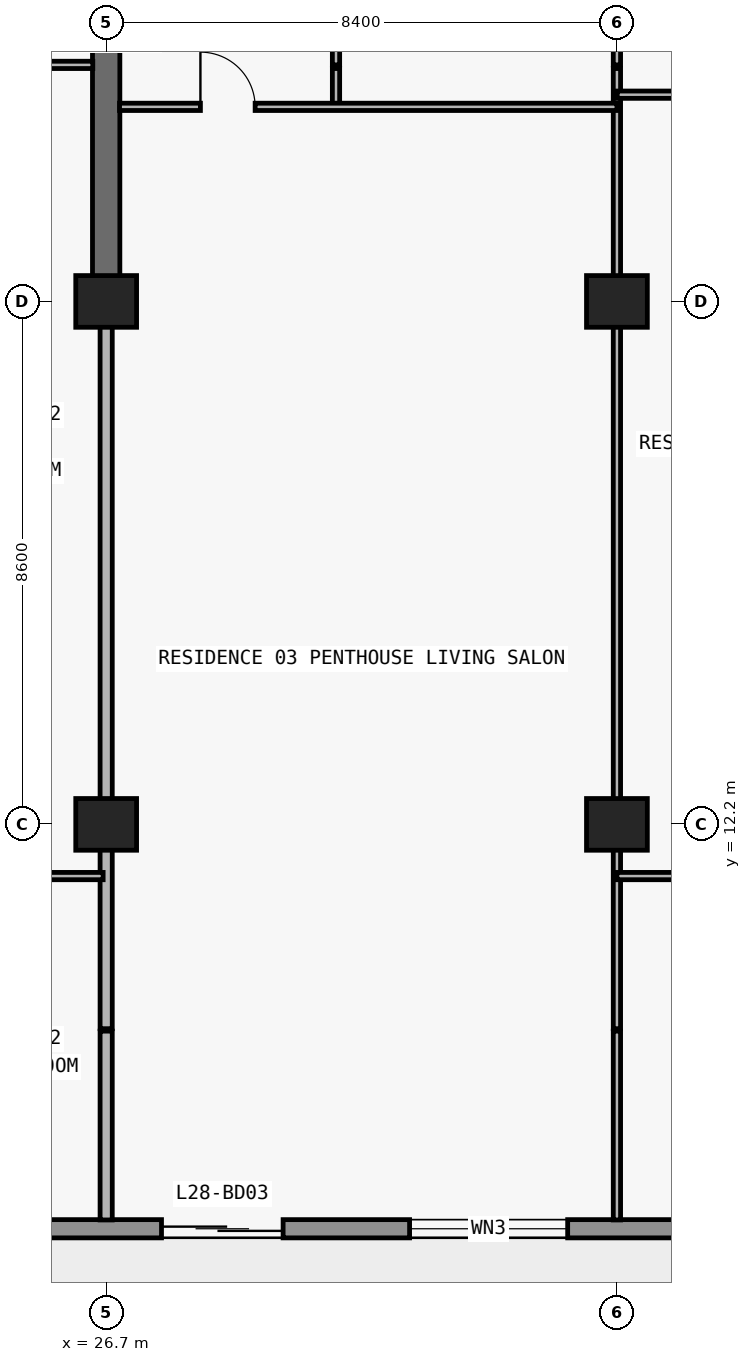
"""IFC4 building model, lengths in metres.
Left out: names, types, materials, properties, quantities, classifications, styles, units other than length and angle.
Written with IfcOpenShell. Run it as: python <this file> out.ifc"""

import sys

from ifc_helpers import new_model, si_unit, direction, frame, frame_2d, origin, origin_2d, place, context, subcontext, project, spatial, rectangle, extrude, element, fill, save


model = new_model("IFC4")
c1 = context("Model", 3, precision=1e-05, world=origin(), true_north=direction((0.0, 1.0)))
c2 = subcontext(c1, "Body", "Model", "MODEL_VIEW")
j1 = project(units=[si_unit("LENGTHUNIT", "METRE"), si_unit("PLANEANGLEUNIT", "RADIAN")], contexts=[c1])
p1 = place(None, origin())
s1 = spatial("IfcSite", under=j1, at=p1, CompositionType="ELEMENT")
p2 = place(p1, origin())
s2 = spatial("IfcBuilding", under=s1, at=p2, CompositionType="ELEMENT")
p3 = place(p2, frame((0.0, 0.0, 105.9)))
s3 = spatial("IfcBuildingStorey", under=s2, at=p3, CompositionType="ELEMENT", Elevation=105.9)
for number, where, z_axis, x_axis in (
    (1, (26.7, 12.2, 0.0), (0.0, 0.0, 1.0), (1.0, 0.0, 0.0)),
    (2, (35.1, 12.2, 0.0), (0.0, 0.0, 1.0), (1.0, 0.0, 0.0)),
    (3, (26.7, 20.8, 0.0), (0.0, 0.0, 1.0), (1.0, 0.0, 0.0)),
    (4, (35.1, 20.8, 0.0), (0.0, 0.0, 1.0), (1.0, 0.0, 0.0)),
):
    element("IfcColumn", number, at=place(p3, frame(where, z_axis=z_axis, x_axis=x_axis)), inside=s3, PredefinedType="COLUMN", context=c2, shape_type="SweptSolid", body=[
        extrude(rectangle(XDim=1.0, YDim=0.85, at=origin_2d()), origin(), (0.0, 0.0, 1.0), 3.05),
    ])
p4 = place(p3, frame((26.7, 20.8, 0.0), z_axis=(0.0, 0.0, 1.0), x_axis=(0.0, 1.0, 0.0)))
e5 = element("IfcWall", 5, at=p4, inside=s3, PredefinedType="SHEAR", context=c2, shape_type="SweptSolid", body=[
    extrude(rectangle(XDim=8.6, YDim=0.45, at=frame_2d((4.3, 0.0))), origin(), (0.0, 0.0, 1.0), 3.05),
])
p5 = place(p3, frame((70.1, 5.55, 0.0), z_axis=(0.0, 0.0, 1.0), x_axis=(-1.0, 0.0, 0.0)))
e6 = element("IfcWall", 6, at=p5, inside=s3, PredefinedType="STANDARD", context=c2, shape_type="SweptSolid", body=[
    extrude(rectangle(XDim=62.4, YDim=0.3, at=frame_2d((31.2, 0.0))), origin(), (0.0, 0.0, 1.0), 3.05),
])
p6 = place(p5, frame((57.226, 0.0, 0.0)))
e7 = element("IfcOpeningElement", 7, at=p6, cuts=e6, PredefinedType="OPENING", context=c2, shape_type="SweptSolid", body=[
    extrude(rectangle(XDim=2.0, YDim=2.3, at=frame_2d((1.0, 1.15))), frame((0.0, 0.16, 0.0), z_axis=(0.0, -1.0, 0.0), x_axis=(1.0, 0.0, 0.0)), (0.0, 0.0, 1.0), 0.32),
])
p7 = place(p5, frame((52.926, 0.0, 0.85)))
e8 = element("IfcOpeningElement", 8, at=p7, cuts=e6, PredefinedType="OPENING", context=c2, shape_type="SweptSolid", body=[
    extrude(rectangle(XDim=2.2, YDim=1.55, at=frame_2d((1.1, 0.775))), frame((0.0, 0.16, 0.0), z_axis=(0.0, -1.0, 0.0), x_axis=(1.0, 0.0, 0.0)), (0.0, 0.0, 1.0), 0.32),
])
p8 = place(p5, frame((48.49, 0.0, 0.0)))
e9 = element("IfcOpeningElement", 9, at=p8, cuts=e6, PredefinedType="OPENING", context=c2, shape_type="SweptSolid", body=[
    extrude(rectangle(XDim=2.0, YDim=2.3, at=frame_2d((1.0, 1.15))), frame((0.0, 0.16, 0.0), z_axis=(0.0, -1.0, 0.0), x_axis=(1.0, 0.0, 0.0)), (0.0, 0.0, 1.0), 0.32),
])
p9 = place(p5, frame((44.39, 0.0, 0.85)))
e10 = element("IfcOpeningElement", 10, at=p9, cuts=e6, PredefinedType="OPENING", context=c2, shape_type="SweptSolid", body=[
    extrude(rectangle(XDim=1.8, YDim=1.55, at=frame_2d((0.9, 0.775))), frame((0.0, 0.16, 0.0), z_axis=(0.0, -1.0, 0.0), x_axis=(1.0, 0.0, 0.0)), (0.0, 0.0, 1.0), 0.32),
])
p10 = place(p5, frame((40.49, 0.0, 0.0)))
e11 = element("IfcOpeningElement", 11, at=p10, cuts=e6, PredefinedType="OPENING", context=c2, shape_type="SweptSolid", body=[
    extrude(rectangle(XDim=2.0, YDim=2.3, at=frame_2d((1.0, 1.15))), frame((0.0, 0.16, 0.0), z_axis=(0.0, -1.0, 0.0), x_axis=(1.0, 0.0, 0.0)), (0.0, 0.0, 1.0), 0.32),
])
p11 = place(p5, frame((35.81, 0.0, 0.65)))
e12 = element("IfcOpeningElement", 12, at=p11, cuts=e6, PredefinedType="OPENING", context=c2, shape_type="SweptSolid", body=[
    extrude(rectangle(XDim=2.6, YDim=1.85, at=frame_2d((1.3, 0.925))), frame((0.0, 0.16, 0.0), z_axis=(0.0, -1.0, 0.0), x_axis=(1.0, 0.0, 0.0)), (0.0, 0.0, 1.0), 0.32),
])
p12 = place(p5, frame((30.1, 0.0, 0.85)))
e13 = element("IfcOpeningElement", 13, at=p12, cuts=e6, PredefinedType="OPENING", context=c2, shape_type="SweptSolid", body=[
    extrude(rectangle(XDim=2.2, YDim=1.55, at=frame_2d((1.1, 0.775))), frame((0.0, 0.16, 0.0), z_axis=(0.0, -1.0, 0.0), x_axis=(1.0, 0.0, 0.0)), (0.0, 0.0, 1.0), 0.32),
])
p13 = place(p5, frame((22.1, 0.0, 0.85)))
e14 = element("IfcOpeningElement", 14, at=p13, cuts=e6, PredefinedType="OPENING", context=c2, shape_type="SweptSolid", body=[
    extrude(rectangle(XDim=2.2, YDim=1.55, at=frame_2d((1.1, 0.775))), frame((0.0, 0.16, 0.0), z_axis=(0.0, -1.0, 0.0), x_axis=(1.0, 0.0, 0.0)), (0.0, 0.0, 1.0), 0.32),
])
p14 = place(p5, frame((15.69, 0.0, 0.0)))
e15 = element("IfcOpeningElement", 15, at=p14, cuts=e6, PredefinedType="OPENING", context=c2, shape_type="SweptSolid", body=[
    extrude(rectangle(XDim=2.0, YDim=2.3, at=frame_2d((1.0, 1.15))), frame((0.0, 0.16, 0.0), z_axis=(0.0, -1.0, 0.0), x_axis=(1.0, 0.0, 0.0)), (0.0, 0.0, 1.0), 0.32),
])
p15 = place(p5, frame((11.59, 0.0, 0.85)))
e16 = element("IfcOpeningElement", 16, at=p15, cuts=e6, PredefinedType="OPENING", context=c2, shape_type="SweptSolid", body=[
    extrude(rectangle(XDim=1.8, YDim=1.55, at=frame_2d((0.9, 0.775))), frame((0.0, 0.16, 0.0), z_axis=(0.0, -1.0, 0.0), x_axis=(1.0, 0.0, 0.0)), (0.0, 0.0, 1.0), 0.32),
])
p16 = place(p5, frame((7.626, 0.0, 0.0)))
e17 = element("IfcOpeningElement", 17, at=p16, cuts=e6, PredefinedType="OPENING", context=c2, shape_type="SweptSolid", body=[
    extrude(rectangle(XDim=2.0, YDim=2.3, at=frame_2d((1.0, 1.15))), frame((0.0, 0.16, 0.0), z_axis=(0.0, -1.0, 0.0), x_axis=(1.0, 0.0, 0.0)), (0.0, 0.0, 1.0), 0.32),
])
p17 = place(p5, frame((3.326, 0.0, 0.85)))
e18 = element("IfcOpeningElement", 18, at=p17, cuts=e6, PredefinedType="OPENING", context=c2, shape_type="SweptSolid", body=[
    extrude(rectangle(XDim=2.2, YDim=1.55, at=frame_2d((1.1, 0.775))), frame((0.0, 0.16, 0.0), z_axis=(0.0, -1.0, 0.0), x_axis=(1.0, 0.0, 0.0)), (0.0, 0.0, 1.0), 0.32),
])
p18 = place(p3, frame((26.7, 5.695, 0.0), z_axis=(0.0, 0.0, 1.0), x_axis=(0.0, 1.0, 0.0)))
e19 = element("IfcWall", 19, at=p18, inside=s3, PredefinedType="PARTITIONING", context=c2, shape_type="SweptSolid", body=[
    extrude(rectangle(XDim=3.105, YDim=0.2, at=frame_2d((1.552, 0.0))), origin(), (0.0, 0.0, 1.0), 3.05),
])
p19 = place(p3, frame((26.7, 8.84, 0.0), z_axis=(0.0, 0.0, 1.0), x_axis=(0.0, 1.0, 0.0)))
e20 = element("IfcWall", 20, at=p19, inside=s3, PredefinedType="PARTITIONING", context=c2, shape_type="SweptSolid", body=[
    extrude(rectangle(XDim=11.955, YDim=0.2, at=frame_2d((5.978, 0.0))), origin(), (0.0, 0.0, 1.0), 2.174),
])
p20 = place(p3, frame((30.48, 24.0, 0.0), z_axis=(0.0, 0.0, 1.0), x_axis=(0.0, 1.0, 0.0)))
e21 = element("IfcWall", 21, at=p20, inside=s3, PredefinedType="PARTITIONING", context=c2, shape_type="SweptSolid", body=[
    extrude(rectangle(XDim=0.63, YDim=0.12, at=frame_2d((0.315, 0.0))), origin(), (0.0, 0.0, 1.0), 3.05),
])
p21 = place(p3, frame((30.48, 24.69, 0.0), z_axis=(0.0, 0.0, 1.0), x_axis=(0.0, 1.0, 0.0)))
e22 = element("IfcWall", 22, at=p21, inside=s3, PredefinedType="PARTITIONING", context=c2, shape_type="SweptSolid", body=[
    extrude(rectangle(XDim=0.34, YDim=0.12, at=frame_2d((0.17, 0.0))), origin(), (0.0, 0.0, 1.0), 3.05),
])
p22 = place(p3, frame((35.1, 5.695, 0.0), z_axis=(0.0, 0.0, 1.0), x_axis=(0.0, 1.0, 0.0)))
e23 = element("IfcWall", 23, at=p22, inside=s3, PredefinedType="PARTITIONING", context=c2, shape_type="SweptSolid", body=[
    extrude(rectangle(XDim=3.105, YDim=0.12, at=frame_2d((1.552, 0.0))), origin(), (0.0, 0.0, 1.0), 3.05),
])
p23 = place(p3, frame((35.1, 8.84, 0.0), z_axis=(0.0, 0.0, 1.0), x_axis=(0.0, 1.0, 0.0)))
e24 = element("IfcWall", 24, at=p23, inside=s3, PredefinedType="PARTITIONING", context=c2, shape_type="SweptSolid", body=[
    extrude(rectangle(XDim=15.79, YDim=0.12, at=frame_2d((7.895, 0.0))), origin(), (0.0, 0.0, 1.0), 2.174),
])
p24 = place(p3, frame((35.1, 24.69, 0.0), z_axis=(0.0, 0.0, 1.0), x_axis=(0.0, 1.0, 0.0)))
e25 = element("IfcWall", 25, at=p24, inside=s3, PredefinedType="PARTITIONING", context=c2, shape_type="SweptSolid", body=[
    extrude(rectangle(XDim=0.34, YDim=0.12, at=frame_2d((0.17, 0.0))), origin(), (0.0, 0.0, 1.0), 2.174),
])
p25 = place(p3, frame((22.92, 11.35, 0.0), z_axis=(0.0, 0.0, 1.0), x_axis=(1.0, 0.0, 0.0)))
e26 = element("IfcWall", 26, at=p25, inside=s3, PredefinedType="PARTITIONING", context=c2, shape_type="SweptSolid", body=[
    extrude(rectangle(XDim=3.73, YDim=0.12, at=frame_2d((1.865, 0.0))), origin(), (0.0, 0.0, 1.0), 3.05),
])
p26 = place(p25, frame((1.415, 0.0, 0.0)))
e27 = element("IfcOpeningElement", 27, at=p26, cuts=e26, PredefinedType="OPENING", context=c2, shape_type="SweptSolid", body=[
    extrude(rectangle(XDim=0.9, YDim=2.15, at=frame_2d((0.45, 1.075))), frame((0.0, 0.07, 0.0), z_axis=(0.0, -1.0, 0.0), x_axis=(1.0, 0.0, 0.0)), (0.0, 0.0, 1.0), 0.14),
])
p27 = place(p3, frame((35.1, 11.35, 0.0), z_axis=(0.0, 0.0, 1.0), x_axis=(1.0, 0.0, 0.0)))
e28 = element("IfcWall", 28, at=p27, inside=s3, PredefinedType="PARTITIONING", context=c2, shape_type="SweptSolid", body=[
    extrude(rectangle(XDim=16.0, YDim=0.12, at=frame_2d((8.0, 0.0))), origin(), (0.0, 0.0, 1.0), 3.05),
])
p28 = place(p27, frame((3.35, 0.0, 0.0)))
e29 = element("IfcOpeningElement", 29, at=p28, cuts=e28, PredefinedType="OPENING", context=c2, shape_type="SweptSolid", body=[
    extrude(rectangle(XDim=0.9, YDim=2.15, at=frame_2d((0.45, 1.075))), frame((0.0, 0.07, 0.0), z_axis=(0.0, -1.0, 0.0), x_axis=(1.0, 0.0, 0.0)), (0.0, 0.0, 1.0), 0.14),
])
p29 = place(p27, frame((11.35, 0.0, 0.0)))
e30 = element("IfcOpeningElement", 30, at=p29, cuts=e28, PredefinedType="OPENING", context=c2, shape_type="SweptSolid", body=[
    extrude(rectangle(XDim=0.9, YDim=2.15, at=frame_2d((0.45, 1.075))), frame((0.0, 0.07, 0.0), z_axis=(0.0, -1.0, 0.0), x_axis=(1.0, 0.0, 0.0)), (0.0, 0.0, 1.0), 0.14),
])
p30 = place(p3, frame((26.92, 24.0, 0.0), z_axis=(0.0, 0.0, 1.0), x_axis=(1.0, 0.0, 0.0)))
e31 = element("IfcWall", 31, at=p30, inside=s3, PredefinedType="PARTITIONING", context=c2, shape_type="SweptSolid", body=[
    extrude(rectangle(XDim=8.18, YDim=0.12, at=frame_2d((4.09, 0.0))), origin(), (0.0, 0.0, 1.0), 3.05),
])
p31 = place(p30, frame((1.33, 0.0, 0.0)))
e32 = element("IfcOpeningElement", 32, at=p31, cuts=e31, PredefinedType="OPENING", context=c2, shape_type="SweptSolid", body=[
    extrude(rectangle(XDim=0.9, YDim=2.15, at=frame_2d((0.45, 1.075))), frame((0.0, 0.07, 0.0), z_axis=(0.0, -1.0, 0.0), x_axis=(1.0, 0.0, 0.0)), (0.0, 0.0, 1.0), 0.14),
])
p32 = place(p3, frame((35.105, 24.2, 0.0), z_axis=(0.0, 0.0, 1.0), x_axis=(1.0, 0.0, 0.0)))
e33 = element("IfcWall", 33, at=p32, inside=s3, PredefinedType="PARTITIONING", context=c2, shape_type="SweptSolid", body=[
    extrude(rectangle(XDim=7.59, YDim=0.12, at=frame_2d((3.795, 0.0))), origin(), (0.0, 0.0, 1.0), 3.05),
])
p33 = place(p32, frame((3.345, 0.0, 0.0)))
e34 = element("IfcOpeningElement", 34, at=p33, cuts=e33, PredefinedType="OPENING", context=c2, shape_type="SweptSolid", body=[
    extrude(rectangle(XDim=0.9, YDim=2.15, at=frame_2d((0.45, 1.075))), frame((0.0, 0.07, 0.0), z_axis=(0.0, -1.0, 0.0), x_axis=(1.0, 0.0, 0.0)), (0.0, 0.0, 1.0), 0.14),
])
p34 = place(p3, frame((18.3, 24.69, 0.0), z_axis=(0.0, 0.0, 1.0), x_axis=(1.0, 0.0, 0.0)))
e35 = element("IfcWall", 35, at=p34, inside=s3, PredefinedType="PARTITIONING", context=c2, shape_type="SweptSolid", body=[
    extrude(rectangle(XDim=8.18, YDim=0.12, at=frame_2d((4.09, 0.0))), origin(), (0.0, 0.0, 1.0), 3.05),
])
p35 = place(p34, frame((1.818, 0.0, 0.0)))
e36 = element("IfcOpeningElement", 36, at=p35, cuts=e35, PredefinedType="OPENING", context=c2, shape_type="SweptSolid", body=[
    extrude(rectangle(XDim=0.9, YDim=2.15, at=frame_2d((0.45, 1.075))), frame((0.0, 0.07, 0.0), z_axis=(0.0, -1.0, 0.0), x_axis=(1.0, 0.0, 0.0)), (0.0, 0.0, 1.0), 0.14),
])
p36 = place(p34, frame((5.95, 0.0, 0.0)))
e37 = element("IfcOpeningElement", 37, at=p36, cuts=e35, PredefinedType="OPENING", context=c2, shape_type="SweptSolid", body=[
    extrude(rectangle(XDim=0.9, YDim=2.15, at=frame_2d((0.45, 1.075))), frame((0.0, 0.07, 0.0), z_axis=(0.0, -1.0, 0.0), x_axis=(1.0, 0.0, 0.0)), (0.0, 0.0, 1.0), 0.14),
])
p37 = place(p10, origin())
e38 = element("IfcDoor", 38, at=p37, inside=s3, OperationType="DOUBLE_DOOR_SLIDING", PredefinedType="DOOR", context=c2, shape_type="SweptSolid", body=[
    extrude(rectangle(XDim=2.0, YDim=2.3, at=frame_2d((1.0, 1.15))), frame((0.0, 0.025, 0.0), z_axis=(0.0, -1.0, 0.0), x_axis=(1.0, 0.0, 0.0)), (0.0, 0.0, 1.0), 0.05),
])
fill(e11, e38)
p38 = place(p11, origin())
e39 = element("IfcWindow", 39, at=p38, inside=s3, PartitioningType="SINGLE_PANEL", PredefinedType="WINDOW", context=c2, shape_type="SweptSolid", body=[
    extrude(rectangle(XDim=2.6, YDim=1.85, at=frame_2d((1.3, 0.925))), frame((0.0, 0.03, 0.0), z_axis=(0.0, -1.0, 0.0), x_axis=(1.0, 0.0, 0.0)), (0.0, 0.0, 1.0), 0.06),
])
fill(e12, e39)
p39 = place(p31, origin())
e40 = element("IfcDoor", 40, at=p39, inside=s3, OperationType="SINGLE_SWING_LEFT", PredefinedType="DOOR", context=c2, shape_type="SweptSolid", body=[
    extrude(rectangle(XDim=0.9, YDim=2.15, at=frame_2d((0.45, 1.075))), frame((0.0, 0.025, 0.0), z_axis=(0.0, -1.0, 0.0), x_axis=(1.0, 0.0, 0.0)), (0.0, 0.0, 1.0), 0.05),
])
fill(e32, e40)
save(model, sys.argv[1])
